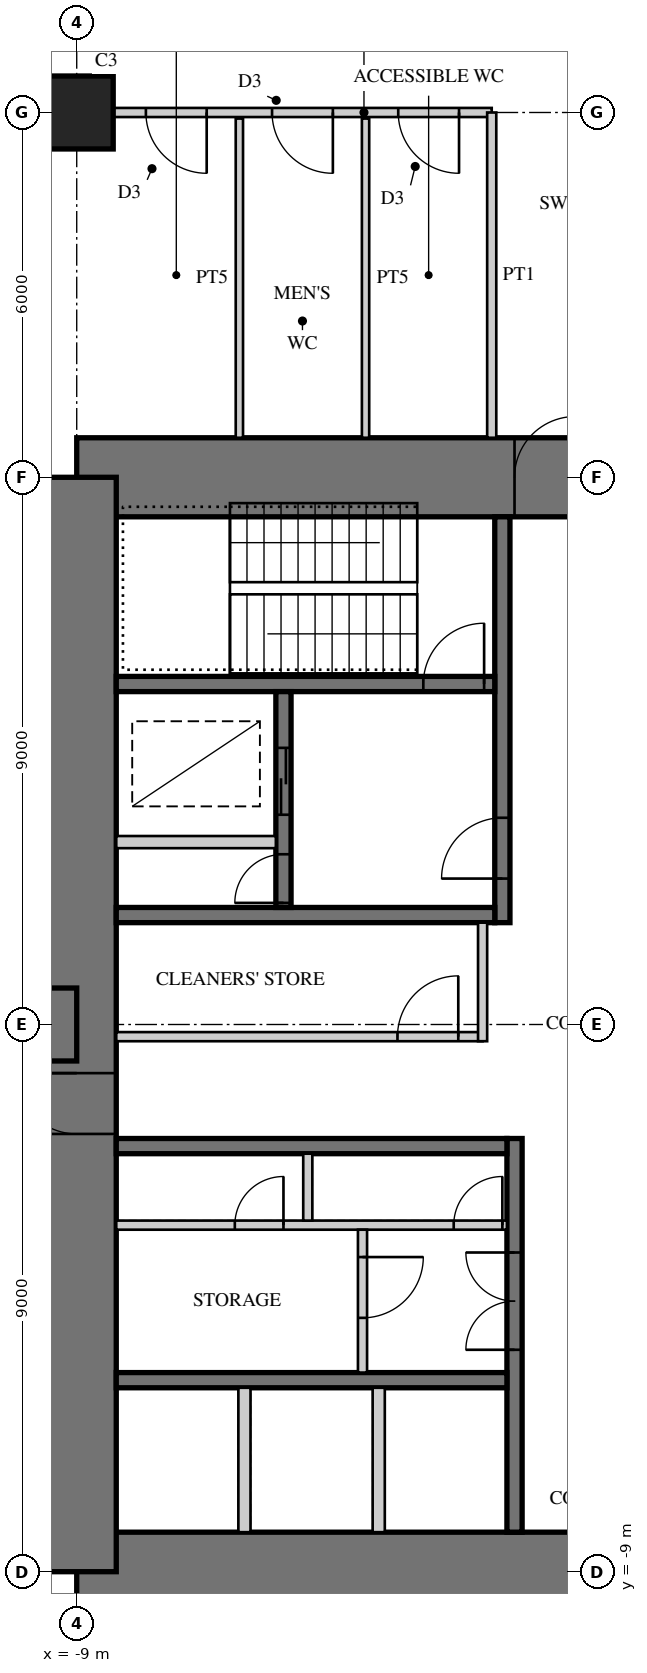
"""IFC4 building model, lengths in metres.
Left out: names, types, materials, properties, quantities, classifications, styles, units other than length and angle.
Written with IfcOpenShell. Run it as: python <this file> out.ifc"""

import sys

from ifc_helpers import new_model, si_unit, direction, frame, frame_2d, origin, origin_2d, place, context, subcontext, project, spatial, rectangle, extrude, element, fill, save


model = new_model("IFC4")
c1 = context("Model", 3, precision=1e-05, world=origin(), true_north=direction((0.0, 1.0)))
c2 = subcontext(c1, "Body", "Model", "MODEL_VIEW")
j1 = project(units=[si_unit("LENGTHUNIT", "METRE"), si_unit("PLANEANGLEUNIT", "RADIAN")], contexts=[c1])
p1 = place(None, origin())
s1 = spatial("IfcSite", under=j1, at=p1, CompositionType="ELEMENT")
p2 = place(p1, origin())
s2 = spatial("IfcBuilding", under=s1, at=p2, CompositionType="ELEMENT")
p3 = place(p2, frame((0.0, 0.0, 47.5)))
s3 = spatial("IfcBuildingStorey", under=s2, at=p3, CompositionType="ELEMENT", Elevation=47.5)
p4 = place(p3, frame((9.0, 9.0, 0.0), z_axis=(0.0, 0.0, 1.0), x_axis=(-1.0, 0.0, 0.0)))
e1 = element("IfcWall", 1, at=p4, inside=s3, PredefinedType="SHEAR", context=c2, shape_type="SweptSolid", body=[
    extrude(rectangle(XDim=18.0, YDim=1.3, at=frame_2d((9.0, 0.0))), origin(), (0.0, 0.0, 1.0), 4.0),
])
p5 = place(p4, frame((9.8, 0.0, 0.0)))
e2 = element("IfcOpeningElement", 2, at=p5, cuts=e1, PredefinedType="OPENING", context=c2, shape_type="SweptSolid", body=[
    extrude(rectangle(XDim=1.0, YDim=2.4, at=frame_2d((0.5, 1.2))), frame((0.0, 0.66, 0.0), z_axis=(0.0, -1.0, 0.0), x_axis=(1.0, 0.0, 0.0)), (0.0, 0.0, 1.0), 1.32),
])
p6 = place(p3, frame((-9.0, -9.0, 0.0), z_axis=(0.0, 0.0, 1.0), x_axis=(1.0, 0.0, 0.0)))
e3 = element("IfcWall", 3, at=p6, inside=s3, PredefinedType="SHEAR", context=c2, shape_type="SweptSolid", body=[
    extrude(rectangle(XDim=18.0, YDim=1.3, at=frame_2d((9.0, 0.0))), origin(), (0.0, 0.0, 1.0), 4.0),
])
p7 = place(p6, frame((9.8, 0.0, 0.0)))
e4 = element("IfcOpeningElement", 4, at=p7, cuts=e3, PredefinedType="OPENING", context=c2, shape_type="SweptSolid", body=[
    extrude(rectangle(XDim=1.0, YDim=2.4, at=frame_2d((0.5, 1.2))), frame((0.0, 0.66, 0.0), z_axis=(0.0, -1.0, 0.0), x_axis=(1.0, 0.0, 0.0)), (0.0, 0.0, 1.0), 1.32),
])
p8 = place(p3, frame((-9.0, 9.0, 0.0), z_axis=(0.0, 0.0, 1.0), x_axis=(0.0, -1.0, 0.0)))
e5 = element("IfcWall", 5, at=p8, inside=s3, PredefinedType="SHEAR", context=c2, shape_type="SweptSolid", body=[
    extrude(rectangle(XDim=18.0, YDim=1.3, at=frame_2d((9.0, 0.0))), origin(), (0.0, 0.0, 1.0), 4.0),
])
p9 = place(p8, frame((9.8, 0.0, 0.0)))
e6 = element("IfcOpeningElement", 6, at=p9, cuts=e5, PredefinedType="OPENING", context=c2, shape_type="SweptSolid", body=[
    extrude(rectangle(XDim=1.0, YDim=2.4, at=frame_2d((0.5, 1.2))), frame((0.0, 0.66, 0.0), z_axis=(0.0, -1.0, 0.0), x_axis=(1.0, 0.0, 0.0)), (0.0, 0.0, 1.0), 1.32),
])
p10 = place(p3, frame((-2.0, 1.675, 0.0), z_axis=(0.0, 0.0, 1.0), x_axis=(0.0, 1.0, 0.0)))
e7 = element("IfcWall", 7, at=p10, inside=s3, PredefinedType="SHEAR", context=c2, shape_type="SweptSolid", body=[
    extrude(rectangle(XDim=6.675, YDim=0.25, at=frame_2d((3.337, 0.0))), origin(), (0.0, 0.0, 1.0), 4.0),
])
p11 = place(p10, frame((0.725, 0.0, 0.0)))
e8 = element("IfcOpeningElement", 8, at=p11, cuts=e7, PredefinedType="OPENING", context=c2, shape_type="SweptSolid", body=[
    extrude(rectangle(XDim=1.0, YDim=2.1, at=frame_2d((0.5, 1.05))), frame((0.0, 0.135, 0.0), z_axis=(0.0, -1.0, 0.0), x_axis=(1.0, 0.0, 0.0)), (0.0, 0.0, 1.0), 0.27),
])
p12 = place(p3, frame((-2.125, 1.8, 0.0), z_axis=(0.0, 0.0, 1.0), x_axis=(-1.0, 0.0, 0.0)))
e9 = element("IfcWall", 9, at=p12, inside=s3, PredefinedType="SHEAR", context=c2, shape_type="SweptSolid", body=[
    extrude(rectangle(XDim=6.225, YDim=0.25, at=frame_2d((3.113, 0.0))), origin(), (0.0, 0.0, 1.0), 4.0),
])
p13 = place(p3, frame((-2.125, 5.6, 0.0), z_axis=(0.0, 0.0, 1.0), x_axis=(-1.0, 0.0, 0.0)))
e10 = element("IfcWall", 10, at=p13, inside=s3, PredefinedType="SHEAR", context=c2, shape_type="SweptSolid", body=[
    extrude(rectangle(XDim=6.225, YDim=0.25, at=frame_2d((3.113, 0.0))), origin(), (0.0, 0.0, 1.0), 4.0),
])
p14 = place(p13, frame((0.175, 0.0, 0.0)))
e11 = element("IfcOpeningElement", 11, at=p14, cuts=e10, PredefinedType="OPENING", context=c2, shape_type="SweptSolid", body=[
    extrude(rectangle(XDim=1.0, YDim=2.1, at=frame_2d((0.5, 1.05))), frame((0.0, 0.135, 0.0), z_axis=(0.0, -1.0, 0.0), x_axis=(1.0, 0.0, 0.0)), (0.0, 0.0, 1.0), 0.27),
])
p15 = place(p3, frame((-5.6, 1.925, 0.0), z_axis=(0.0, 0.0, 1.0), x_axis=(0.0, 1.0, 0.0)))
e12 = element("IfcWall", 12, at=p15, inside=s3, PredefinedType="SHEAR", context=c2, shape_type="SweptSolid", body=[
    extrude(rectangle(XDim=3.55, YDim=0.25, at=frame_2d((1.775, 0.0))), origin(), (0.0, 0.0, 1.0), 4.0),
])
p16 = place(p15, frame((1.525, 0.0, 0.0)))
e13 = element("IfcOpeningElement", 13, at=p16, cuts=e12, PredefinedType="OPENING", context=c2, shape_type="SweptSolid", body=[
    extrude(rectangle(XDim=1.1, YDim=2.2, at=frame_2d((0.55, 1.1))), frame((0.0, 0.135, 0.0), z_axis=(0.0, -1.0, 0.0), x_axis=(1.0, 0.0, 0.0)), (0.0, 0.0, 1.0), 0.27),
])
p17 = place(p15, frame((0.075, 0.0, 0.0)))
e14 = element("IfcOpeningElement", 14, at=p17, cuts=e12, PredefinedType="OPENING", context=c2, shape_type="SweptSolid", body=[
    extrude(rectangle(XDim=0.8, YDim=2.1, at=frame_2d((0.4, 1.05))), frame((0.0, 0.135, 0.0), z_axis=(0.0, -1.0, 0.0), x_axis=(1.0, 0.0, 0.0)), (0.0, 0.0, 1.0), 0.27),
])
p18 = place(p3, frame((-5.725, 3.0, 0.0), z_axis=(0.0, 0.0, 1.0), x_axis=(-1.0, 0.0, 0.0)))
e15 = element("IfcWall", 15, at=p18, inside=s3, PredefinedType="PARTITIONING", context=c2, shape_type="SweptSolid", body=[
    extrude(rectangle(XDim=2.625, YDim=0.2, at=frame_2d((1.312, 0.0))), origin(), (0.0, 0.0, 1.0), 4.0),
])
p19 = place(p3, frame((-1.8, -1.875, 0.0), z_axis=(0.0, 0.0, 1.0), x_axis=(0.0, -1.0, 0.0)))
e16 = element("IfcWall", 16, at=p19, inside=s3, PredefinedType="SHEAR", context=c2, shape_type="SweptSolid", body=[
    extrude(rectangle(XDim=6.475, YDim=0.25, at=frame_2d((3.238, 0.0))), origin(), (0.0, 0.0, 1.0), 4.0),
])
p20 = place(p19, frame((1.875, 0.0, 0.0)))
e17 = element("IfcOpeningElement", 17, at=p20, cuts=e16, PredefinedType="OPENING", context=c2, shape_type="SweptSolid", body=[
    extrude(rectangle(XDim=1.6, YDim=2.4, at=frame_2d((0.8, 1.2))), frame((0.0, 0.135, 0.0), z_axis=(0.0, -1.0, 0.0), x_axis=(1.0, 0.0, 0.0)), (0.0, 0.0, 1.0), 0.27),
])
for number, where, z_axis, x_axis in (
    (18, (-1.925, -2.0, 0.0), (0.0, 0.0, 1.0), (-1.0, 0.0, 0.0)),
    (19, (-1.925, -5.85, 0.0), (0.0, 0.0, 1.0), (-1.0, 0.0, 0.0)),
):
    element("IfcWall", number, at=place(p3, frame(where, z_axis=z_axis, x_axis=x_axis)), inside=s3, PredefinedType="SHEAR", context=c2, shape_type="SweptSolid", body=[
        extrude(rectangle(XDim=6.425, YDim=0.25, at=frame_2d((3.212, 0.0))), origin(), (0.0, 0.0, 1.0), 4.0),
    ])
p21 = place(p3, frame((-1.925, -3.3, 0.0), z_axis=(0.0, 0.0, 1.0), x_axis=(-1.0, 0.0, 0.0)))
e20 = element("IfcWall", 20, at=p21, inside=s3, PredefinedType="PARTITIONING", context=c2, shape_type="SweptSolid", body=[
    extrude(rectangle(XDim=6.425, YDim=0.15, at=frame_2d((3.212, 0.0))), origin(), (0.0, 0.0, 1.0), 4.0),
])
p22 = place(p21, frame((0.075, 0.0, 0.0)))
e21 = element("IfcOpeningElement", 21, at=p22, cuts=e20, PredefinedType="OPENING", context=c2, shape_type="SweptSolid", body=[
    extrude(rectangle(XDim=0.8, YDim=2.1, at=frame_2d((0.4, 1.05))), frame((0.0, 0.085, 0.0), z_axis=(0.0, -1.0, 0.0), x_axis=(1.0, 0.0, 0.0)), (0.0, 0.0, 1.0), 0.17),
])
p23 = place(p21, frame((3.675, 0.0, 0.0)))
e22 = element("IfcOpeningElement", 22, at=p23, cuts=e20, PredefinedType="OPENING", context=c2, shape_type="SweptSolid", body=[
    extrude(rectangle(XDim=0.8, YDim=2.1, at=frame_2d((0.4, 1.05))), frame((0.0, 0.085, 0.0), z_axis=(0.0, -1.0, 0.0), x_axis=(1.0, 0.0, 0.0)), (0.0, 0.0, 1.0), 0.17),
])
p24 = place(p3, frame((-5.2, -2.125, 0.0), z_axis=(0.0, 0.0, 1.0), x_axis=(0.0, -1.0, 0.0)))
e23 = element("IfcWall", 23, at=p24, inside=s3, PredefinedType="PARTITIONING", context=c2, shape_type="SweptSolid", body=[
    extrude(rectangle(XDim=1.1, YDim=0.15, at=frame_2d((0.55, 0.0))), origin(), (0.0, 0.0, 1.0), 4.0),
])
for number, where, z_axis, x_axis in (
    (24, (-4.033, -5.975, 0.0), (0.0, 0.0, 1.0), (0.0, -1.0, 0.0)),
    (25, (-6.242, -5.975, 0.0), (0.0, 0.0, 1.0), (0.0, -1.0, 0.0)),
):
    element("IfcWall", number, at=place(p3, frame(where, z_axis=z_axis, x_axis=x_axis)), inside=s3, PredefinedType="PARTITIONING", context=c2, shape_type="SweptSolid", body=[
        extrude(rectangle(XDim=2.375, YDim=0.2, at=frame_2d((1.188, 0.0))), origin(), (0.0, 0.0, 1.0), 4.0),
    ])
p25 = place(p3, frame((-9.0, 0.0, 0.0), z_axis=(0.0, 0.0, 1.0), x_axis=(-1.0, 0.0, 0.0)))
e26 = element("IfcWall", 26, at=p25, inside=s3, PredefinedType="SHEAR", context=c2, shape_type="SweptSolid", body=[
    extrude(rectangle(XDim=18.0, YDim=1.2, at=frame_2d((9.0, 0.0))), origin(), (0.0, 0.0, 1.0), 4.0),
])
p26 = place(p25, frame((9.9, 0.0, 0.0)))
e27 = element("IfcOpeningElement", 27, at=p26, cuts=e26, PredefinedType="OPENING", context=c2, shape_type="SweptSolid", body=[
    extrude(rectangle(XDim=1.0, YDim=2.2, at=frame_2d((0.5, 1.1))), frame((0.0, 0.61, 0.0), z_axis=(0.0, -1.0, 0.0), x_axis=(1.0, 0.0, 0.0)), (0.0, 0.0, 1.0), 1.22),
])
p27 = place(p3, frame((-9.0, 15.0, 0.0), z_axis=(0.0, 0.0, 1.0), x_axis=(1.0, 0.0, 0.0)))
e28 = element("IfcColumn", 28, at=p27, inside=s3, PredefinedType="COLUMN", context=c2, shape_type="SweptSolid", body=[
    extrude(rectangle(XDim=1.2, YDim=1.2, at=origin_2d()), origin(), (0.0, 0.0, 1.0), 4.0),
])
p28 = place(p3, frame((-2.325, -0.2, 0.0), z_axis=(0.0, 0.0, 1.0), x_axis=(-1.0, 0.0, 0.0)))
e29 = element("IfcWall", 29, at=p28, inside=s3, PredefinedType="PARTITIONING", context=c2, shape_type="SweptSolid", body=[
    extrude(rectangle(XDim=6.025, YDim=0.15, at=frame_2d((3.013, 0.0))), origin(), (0.0, 0.0, 1.0), 3.8),
])
p29 = place(p28, frame((0.4, 0.0, 0.0)))
e30 = element("IfcOpeningElement", 30, at=p29, cuts=e29, PredefinedType="OPENING", context=c2, shape_type="SweptSolid", body=[
    extrude(rectangle(XDim=1.0, YDim=2.1, at=frame_2d((0.5, 1.05))), frame((0.0, 0.085, 0.0), z_axis=(0.0, -1.0, 0.0), x_axis=(1.0, 0.0, 0.0)), (0.0, 0.0, 1.0), 0.17),
])
p30 = place(p3, frame((-2.325, 1.675, 0.0), z_axis=(0.0, 0.0, 1.0), x_axis=(0.0, -1.0, 0.0)))
e31 = element("IfcWall", 31, at=p30, inside=s3, PredefinedType="PARTITIONING", context=c2, shape_type="SweptSolid", body=[
    extrude(rectangle(XDim=1.95, YDim=0.15, at=frame_2d((0.975, 0.0))), origin(), (0.0, 0.0, 1.0), 3.8),
])
p31 = place(p3, frame((-4.3, -3.375, 0.0), z_axis=(0.0, 0.0, 1.0), x_axis=(0.0, -1.0, 0.0)))
e32 = element("IfcWall", 32, at=p31, inside=s3, PredefinedType="PARTITIONING", context=c2, shape_type="SweptSolid", body=[
    extrude(rectangle(XDim=2.35, YDim=0.15, at=frame_2d((1.175, 0.0))), origin(), (0.0, 0.0, 1.0), 3.8),
])
p32 = place(p31, frame((0.45, 0.0, 0.0)))
e33 = element("IfcOpeningElement", 33, at=p32, cuts=e32, PredefinedType="OPENING", context=c2, shape_type="SweptSolid", body=[
    extrude(rectangle(XDim=1.0, YDim=2.1, at=frame_2d((0.5, 1.05))), frame((0.0, 0.085, 0.0), z_axis=(0.0, -1.0, 0.0), x_axis=(1.0, 0.0, 0.0)), (0.0, 0.0, 1.0), 0.17),
])
p33 = place(p3, frame((-2.175, 15.0, 0.0), z_axis=(0.0, 0.0, 1.0), x_axis=(-1.0, 0.0, 0.0)))
e34 = element("IfcWall", 34, at=p33, inside=s3, PredefinedType="PARTITIONING", context=c2, shape_type="SweptSolid", body=[
    extrude(rectangle(XDim=6.225, YDim=0.15, at=frame_2d((3.112, 0.0))), origin(), (0.0, 0.0, 1.0), 2.95),
])
p34 = place(p33, frame((0.538, 0.0, 0.0)))
e35 = element("IfcOpeningElement", 35, at=p34, cuts=e34, PredefinedType="OPENING", context=c2, shape_type="SweptSolid", body=[
    extrude(rectangle(XDim=1.0, YDim=2.1, at=frame_2d((0.5, 1.05))), frame((0.0, 0.085, 0.0), z_axis=(0.0, -1.0, 0.0), x_axis=(1.0, 0.0, 0.0)), (0.0, 0.0, 1.0), 0.17),
])
p35 = place(p33, frame((2.613, 0.0, 0.0)))
e36 = element("IfcOpeningElement", 36, at=p35, cuts=e34, PredefinedType="OPENING", context=c2, shape_type="SweptSolid", body=[
    extrude(rectangle(XDim=1.0, YDim=2.1, at=frame_2d((0.5, 1.05))), frame((0.0, 0.085, 0.0), z_axis=(0.0, -1.0, 0.0), x_axis=(1.0, 0.0, 0.0)), (0.0, 0.0, 1.0), 0.17),
])
p36 = place(p33, frame((4.688, 0.0, 0.0)))
e37 = element("IfcOpeningElement", 37, at=p36, cuts=e34, PredefinedType="OPENING", context=c2, shape_type="SweptSolid", body=[
    extrude(rectangle(XDim=1.0, YDim=2.1, at=frame_2d((0.5, 1.05))), frame((0.0, 0.085, 0.0), z_axis=(0.0, -1.0, 0.0), x_axis=(1.0, 0.0, 0.0)), (0.0, 0.0, 1.0), 0.17),
])
p37 = place(p3, frame((-2.175, 9.65, 0.0), z_axis=(0.0, 0.0, 1.0), x_axis=(0.0, 1.0, 0.0)))
e38 = element("IfcWall", 38, at=p37, inside=s3, PredefinedType="PARTITIONING", context=c2, shape_type="SweptSolid", body=[
    extrude(rectangle(XDim=5.35, YDim=0.15, at=frame_2d((2.675, 0.0))), origin(), (0.0, 0.0, 1.0), 3.8),
])
for number, where, z_axis, x_axis in (
    (39, (-4.25, 9.65, 0.0), (0.0, 0.0, 1.0), (0.0, 1.0, 0.0)),
    (40, (-6.325, 9.65, 0.0), (0.0, 0.0, 1.0), (0.0, 1.0, 0.0)),
):
    element("IfcWall", number, at=place(p3, frame(where, z_axis=z_axis, x_axis=x_axis)), inside=s3, PredefinedType="PLUMBINGWALL", context=c2, shape_type="SweptSolid", body=[
        extrude(rectangle(XDim=5.25, YDim=0.12, at=frame_2d((2.625, 0.0))), origin(), (0.0, 0.0, 1.0), 3.8),
    ])
p38 = place(p29, frame((1.0, 0.0, 0.0), z_axis=(0.0, 0.0, 1.0), x_axis=(-1.0, 0.0, 0.0)))
e41 = element("IfcDoor", 41, at=p38, inside=s3, OperationType="SINGLE_SWING_RIGHT", PredefinedType="DOOR", context=c2, shape_type="SweptSolid", body=[
    extrude(rectangle(XDim=1.0, YDim=2.1, at=frame_2d((0.5, 1.05))), frame((0.0, 0.025, 0.0), z_axis=(0.0, -1.0, 0.0), x_axis=(1.0, 0.0, 0.0)), (0.0, 0.0, 1.0), 0.05),
])
fill(e30, e41)
p39 = place(p32, origin())
e42 = element("IfcDoor", 42, at=p39, inside=s3, OperationType="SINGLE_SWING_LEFT", PredefinedType="DOOR", context=c2, shape_type="SweptSolid", body=[
    extrude(rectangle(XDim=1.0, YDim=2.1, at=frame_2d((0.5, 1.05))), frame((0.0, 0.025, 0.0), z_axis=(0.0, -1.0, 0.0), x_axis=(1.0, 0.0, 0.0)), (0.0, 0.0, 1.0), 0.05),
])
fill(e33, e42)
p40 = place(p34, origin())
e43 = element("IfcDoor", 43, at=p40, inside=s3, OperationType="SINGLE_SWING_LEFT", PredefinedType="DOOR", context=c2, shape_type="SweptSolid", body=[
    extrude(rectangle(XDim=1.0, YDim=2.1, at=frame_2d((0.5, 1.05))), frame((0.0, 0.025, 0.0), z_axis=(0.0, -1.0, 0.0), x_axis=(1.0, 0.0, 0.0)), (0.0, 0.0, 1.0), 0.05),
])
fill(e35, e43)
p41 = place(p35, origin())
e44 = element("IfcDoor", 44, at=p41, inside=s3, OperationType="SINGLE_SWING_LEFT", PredefinedType="DOOR", context=c2, shape_type="SweptSolid", body=[
    extrude(rectangle(XDim=1.0, YDim=2.1, at=frame_2d((0.5, 1.05))), frame((0.0, 0.025, 0.0), z_axis=(0.0, -1.0, 0.0), x_axis=(1.0, 0.0, 0.0)), (0.0, 0.0, 1.0), 0.05),
])
fill(e36, e44)
p42 = place(p36, origin())
e45 = element("IfcDoor", 45, at=p42, inside=s3, OperationType="SINGLE_SWING_LEFT", PredefinedType="DOOR", context=c2, shape_type="SweptSolid", body=[
    extrude(rectangle(XDim=1.0, YDim=2.1, at=frame_2d((0.5, 1.05))), frame((0.0, 0.025, 0.0), z_axis=(0.0, -1.0, 0.0), x_axis=(1.0, 0.0, 0.0)), (0.0, 0.0, 1.0), 0.05),
])
fill(e37, e45)
p43 = place(p5, frame((1.0, 0.0, 0.0), z_axis=(0.0, 0.0, 1.0), x_axis=(-1.0, 0.0, 0.0)))
e46 = element("IfcDoor", 46, at=p43, inside=s3, OperationType="SINGLE_SWING_RIGHT", PredefinedType="DOOR", context=c2, shape_type="SweptSolid", body=[
    extrude(rectangle(XDim=1.0, YDim=2.4, at=frame_2d((0.5, 1.2))), frame((0.0, -0.005, 0.0), z_axis=(0.0, -1.0, 0.0), x_axis=(1.0, 0.0, 0.0)), (0.0, 0.0, 1.0), 0.05),
])
fill(e2, e46)
p44 = place(p9, frame((1.0, 0.0, 0.0), z_axis=(0.0, 0.0, 1.0), x_axis=(-1.0, 0.0, 0.0)))
e47 = element("IfcDoor", 47, at=p44, inside=s3, OperationType="SINGLE_SWING_RIGHT", PredefinedType="DOOR", context=c2, shape_type="SweptSolid", body=[
    extrude(rectangle(XDim=1.0, YDim=2.4, at=frame_2d((0.5, 1.2))), frame((0.0, -0.005, 0.0), z_axis=(0.0, -1.0, 0.0), x_axis=(1.0, 0.0, 0.0)), (0.0, 0.0, 1.0), 0.05),
])
fill(e6, e47)
p45 = place(p11, origin())
e48 = element("IfcDoor", 48, at=p45, inside=s3, OperationType="SINGLE_SWING_LEFT", PredefinedType="DOOR", context=c2, shape_type="SweptSolid", body=[
    extrude(rectangle(XDim=1.0, YDim=2.1, at=frame_2d((0.5, 1.05))), frame((0.0, 0.025, 0.0), z_axis=(0.0, -1.0, 0.0), x_axis=(1.0, 0.0, 0.0)), (0.0, 0.0, 1.0), 0.05),
])
fill(e8, e48)
p46 = place(p14, frame((1.0, 0.0, 0.0), z_axis=(0.0, 0.0, 1.0), x_axis=(-1.0, 0.0, 0.0)))
e49 = element("IfcDoor", 49, at=p46, inside=s3, OperationType="SINGLE_SWING_RIGHT", PredefinedType="DOOR", context=c2, shape_type="SweptSolid", body=[
    extrude(rectangle(XDim=1.0, YDim=2.1, at=frame_2d((0.5, 1.05))), frame((0.0, 0.025, 0.0), z_axis=(0.0, -1.0, 0.0), x_axis=(1.0, 0.0, 0.0)), (0.0, 0.0, 1.0), 0.05),
])
fill(e11, e49)
p47 = place(p16, origin())
e50 = element("IfcDoor", 50, at=p47, inside=s3, OperationType="DOUBLE_DOOR_SLIDING", PredefinedType="DOOR", context=c2, shape_type="SweptSolid", body=[
    extrude(rectangle(XDim=1.1, YDim=2.2, at=frame_2d((0.55, 1.1))), frame((0.0, 0.025, 0.0), z_axis=(0.0, -1.0, 0.0), x_axis=(1.0, 0.0, 0.0)), (0.0, 0.0, 1.0), 0.05),
])
fill(e13, e50)
p48 = place(p17, origin())
e51 = element("IfcDoor", 51, at=p48, inside=s3, OperationType="SINGLE_SWING_LEFT", PredefinedType="DOOR", context=c2, shape_type="SweptSolid", body=[
    extrude(rectangle(XDim=0.8, YDim=2.1, at=frame_2d((0.4, 1.05))), frame((0.0, 0.025, 0.0), z_axis=(0.0, -1.0, 0.0), x_axis=(1.0, 0.0, 0.0)), (0.0, 0.0, 1.0), 0.05),
])
fill(e14, e51)
p49 = place(p20, frame((1.6, 0.0, 0.0), z_axis=(0.0, 0.0, 1.0), x_axis=(-1.0, 0.0, 0.0)))
e52 = element("IfcDoor", 52, at=p49, inside=s3, OperationType="DOUBLE_DOOR_SINGLE_SWING", PredefinedType="DOOR", context=c2, shape_type="SweptSolid", body=[
    extrude(rectangle(XDim=1.6, YDim=2.4, at=frame_2d((0.8, 1.2))), frame((0.0, 0.025, 0.0), z_axis=(0.0, -1.0, 0.0), x_axis=(1.0, 0.0, 0.0)), (0.0, 0.0, 1.0), 0.05),
])
fill(e17, e52)
p50 = place(p22, frame((0.8, 0.0, 0.0), z_axis=(0.0, 0.0, 1.0), x_axis=(-1.0, 0.0, 0.0)))
e53 = element("IfcDoor", 53, at=p50, inside=s3, OperationType="SINGLE_SWING_RIGHT", PredefinedType="DOOR", context=c2, shape_type="SweptSolid", body=[
    extrude(rectangle(XDim=0.8, YDim=2.1, at=frame_2d((0.4, 1.05))), frame((0.0, 0.025, 0.0), z_axis=(0.0, -1.0, 0.0), x_axis=(1.0, 0.0, 0.0)), (0.0, 0.0, 1.0), 0.05),
])
fill(e21, e53)
p51 = place(p23, frame((0.8, 0.0, 0.0), z_axis=(0.0, 0.0, 1.0), x_axis=(-1.0, 0.0, 0.0)))
e54 = element("IfcDoor", 54, at=p51, inside=s3, OperationType="SINGLE_SWING_RIGHT", PredefinedType="DOOR", context=c2, shape_type="SweptSolid", body=[
    extrude(rectangle(XDim=0.8, YDim=2.1, at=frame_2d((0.4, 1.05))), frame((0.0, 0.025, 0.0), z_axis=(0.0, -1.0, 0.0), x_axis=(1.0, 0.0, 0.0)), (0.0, 0.0, 1.0), 0.05),
])
fill(e22, e54)
save(model, sys.argv[1])
